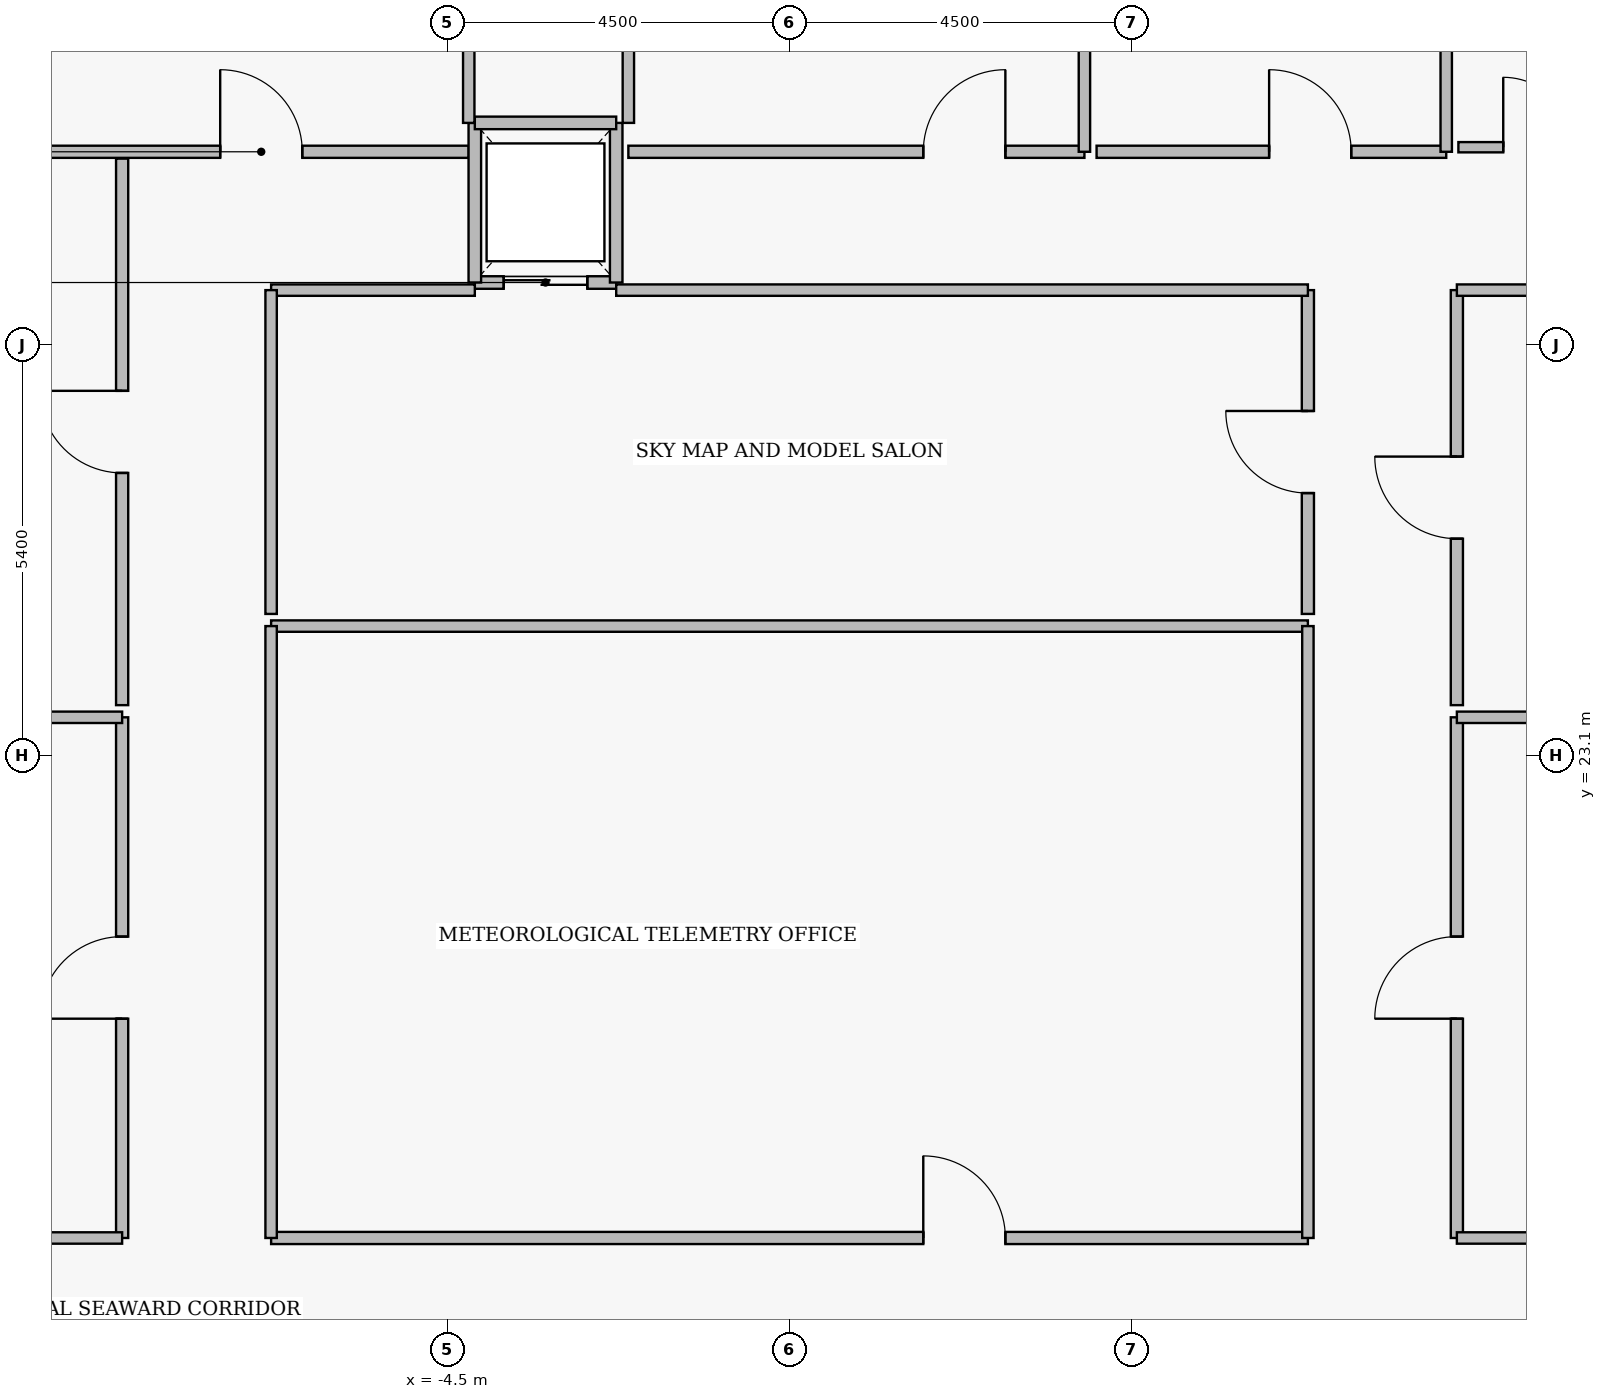
"""IFC4 building model, lengths in metres.
Left out: names, types, materials, properties, quantities, classifications, styles, units other than length and angle.
Written with IfcOpenShell. Run it as: python <this file> out.ifc"""

import sys

from ifc_helpers import new_model, si_unit, direction, frame, frame_2d, origin, place, context, subcontext, project, spatial, rectangle, extrude, element, fill, save


model = new_model("IFC4")
c1 = context("Model", 3, precision=1e-05, world=origin(), true_north=direction((0.0, 1.0)))
c2 = subcontext(c1, "Body", "Model", "MODEL_VIEW")
j1 = project(units=[si_unit("LENGTHUNIT", "METRE"), si_unit("PLANEANGLEUNIT", "RADIAN")], contexts=[c1])
p1 = place(None, origin())
s1 = spatial("IfcSite", under=j1, at=p1, CompositionType="ELEMENT")
p2 = place(p1, origin())
s2 = spatial("IfcBuilding", under=s1, at=p2, CompositionType="ELEMENT")
p3 = place(p2, frame((0.0, 0.0, 292.85)))
s3 = spatial("IfcBuildingStorey", under=s2, at=p3, CompositionType="ELEMENT", Elevation=292.85)
p4 = place(p3, frame((-4.14, 29.32, 0.0), z_axis=(0.0, 0.0, 1.0), x_axis=(1.0, 0.0, 0.0)))
e1 = element("IfcWall", 1, at=p4, inside=s3, PredefinedType="PARTITIONING", context=c2, shape_type="SweptSolid", body=[
    extrude(rectangle(XDim=1.86, YDim=0.165, at=frame_2d((0.93, 0.0))), origin(), (0.0, 0.0, 1.0), 4.16),
])
p5 = place(p4, frame((0.38, 0.0, 0.0)))
e2 = element("IfcOpeningElement", 2, at=p5, cuts=e1, PredefinedType="OPENING", context=c2, shape_type="SweptSolid", body=[
    extrude(rectangle(XDim=1.1, YDim=2.25, at=frame_2d((0.55, 1.125))), frame((0.0, 0.093, 0.0), z_axis=(0.0, -1.0, 0.0), x_axis=(1.0, 0.0, 0.0)), (0.0, 0.0, 1.0), 0.185),
])
p6 = place(p3, frame((-20.14, 31.04, 0.0), z_axis=(0.0, 0.0, 1.0), x_axis=(1.0, 0.0, 0.0)))
e3 = element("IfcWall", 3, at=p6, inside=s3, PredefinedType="PARTITIONING", context=c2, shape_type="SweptSolid", body=[
    extrude(rectangle(XDim=15.92, YDim=0.16, at=frame_2d((7.96, 0.0))), origin(), (0.0, 0.0, 1.0), 4.16),
])
p7 = place(p6, frame((12.65, 0.0, 0.0)))
e4 = element("IfcOpeningElement", 4, at=p7, cuts=e3, PredefinedType="OPENING", context=c2, shape_type="SweptSolid", body=[
    extrude(rectangle(XDim=1.08, YDim=2.18, at=frame_2d((0.54, 1.09))), frame((0.0, 0.09, 0.0), z_axis=(0.0, -1.0, 0.0), x_axis=(1.0, 0.0, 0.0)), (0.0, 0.0, 1.0), 0.18),
])
p8 = place(p3, frame((-2.12, 31.04, 0.0), z_axis=(0.0, 0.0, 1.0), x_axis=(1.0, 0.0, 0.0)))
e5 = element("IfcWall", 5, at=p8, inside=s3, PredefinedType="PARTITIONING", context=c2, shape_type="SweptSolid", body=[
    extrude(rectangle(XDim=6.0, YDim=0.16, at=frame_2d((3.0, 0.0))), origin(), (0.0, 0.0, 1.0), 4.16),
])
p9 = place(p8, frame((3.88, 0.0, 0.0)))
e6 = element("IfcOpeningElement", 6, at=p9, cuts=e5, PredefinedType="OPENING", context=c2, shape_type="SweptSolid", body=[
    extrude(rectangle(XDim=1.08, YDim=2.18, at=frame_2d((0.54, 1.09))), frame((0.0, 0.09, 0.0), z_axis=(0.0, -1.0, 0.0), x_axis=(1.0, 0.0, 0.0)), (0.0, 0.0, 1.0), 0.18),
])
p10 = place(p3, frame((4.04, 31.04, 0.0), z_axis=(0.0, 0.0, 1.0), x_axis=(1.0, 0.0, 0.0)))
e7 = element("IfcWall", 7, at=p10, inside=s3, PredefinedType="PARTITIONING", context=c2, shape_type="SweptSolid", body=[
    extrude(rectangle(XDim=4.6, YDim=0.16, at=frame_2d((2.3, 0.0))), origin(), (0.0, 0.0, 1.0), 4.16),
])
p11 = place(p10, frame((2.27, 0.0, 0.0)))
e8 = element("IfcOpeningElement", 8, at=p11, cuts=e7, PredefinedType="OPENING", context=c2, shape_type="SweptSolid", body=[
    extrude(rectangle(XDim=1.08, YDim=2.18, at=frame_2d((0.54, 1.09))), frame((0.0, 0.09, 0.0), z_axis=(0.0, -1.0, 0.0), x_axis=(1.0, 0.0, 0.0)), (0.0, 0.0, 1.0), 0.18),
])
p12 = place(p3, frame((-6.82, 16.75, 0.0), z_axis=(0.0, 0.0, 1.0), x_axis=(1.0, 0.0, 0.0)))
e9 = element("IfcWall", 9, at=p12, inside=s3, PredefinedType="PARTITIONING", context=c2, shape_type="SweptSolid", body=[
    extrude(rectangle(XDim=13.64, YDim=0.16, at=frame_2d((6.82, 0.0))), origin(), (0.0, 0.0, 1.0), 4.16),
])
p13 = place(p12, frame((8.58, 0.0, 0.0)))
e10 = element("IfcOpeningElement", 10, at=p13, cuts=e9, PredefinedType="OPENING", context=c2, shape_type="SweptSolid", body=[
    extrude(rectangle(XDim=1.08, YDim=2.18, at=frame_2d((0.54, 1.09))), frame((0.0, 0.09, 0.0), z_axis=(0.0, -1.0, 0.0), x_axis=(1.0, 0.0, 0.0)), (0.0, 0.0, 1.0), 0.18),
])
p14 = place(p3, frame((6.82, 24.96, 0.0), z_axis=(0.0, 0.0, 1.0), x_axis=(0.0, 1.0, 0.0)))
e11 = element("IfcWall", 11, at=p14, inside=s3, PredefinedType="PARTITIONING", context=c2, shape_type="SweptSolid", body=[
    extrude(rectangle(XDim=4.26, YDim=0.16, at=frame_2d((2.13, 0.0))), origin(), (0.0, 0.0, 1.0), 4.16),
])
p15 = place(p14, frame((1.59, 0.0, 0.0)))
e12 = element("IfcOpeningElement", 12, at=p15, cuts=e11, PredefinedType="OPENING", context=c2, shape_type="SweptSolid", body=[
    extrude(rectangle(XDim=1.08, YDim=2.18, at=frame_2d((0.54, 1.09))), frame((0.0, 0.09, 0.0), z_axis=(0.0, -1.0, 0.0), x_axis=(1.0, 0.0, 0.0)), (0.0, 0.0, 1.0), 0.18),
])
p16 = place(p3, frame((-8.78, 16.75, 0.0), z_axis=(0.0, 0.0, 1.0), x_axis=(0.0, 1.0, 0.0)))
e13 = element("IfcWall", 13, at=p16, inside=s3, PredefinedType="PARTITIONING", context=c2, shape_type="SweptSolid", body=[
    extrude(rectangle(XDim=6.85, YDim=0.16, at=frame_2d((3.425, 0.0))), origin(), (0.0, 0.0, 1.0), 4.16),
])
p17 = place(p16, frame((2.885, 0.0, 0.0)))
e14 = element("IfcOpeningElement", 14, at=p17, cuts=e13, PredefinedType="OPENING", context=c2, shape_type="SweptSolid", body=[
    extrude(rectangle(XDim=1.08, YDim=2.18, at=frame_2d((0.54, 1.09))), frame((0.0, 0.09, 0.0), z_axis=(0.0, -1.0, 0.0), x_axis=(1.0, 0.0, 0.0)), (0.0, 0.0, 1.0), 0.18),
])
p18 = place(p3, frame((-8.78, 23.76, 0.0), z_axis=(0.0, 0.0, 1.0), x_axis=(0.0, 1.0, 0.0)))
e15 = element("IfcWall", 15, at=p18, inside=s3, PredefinedType="PARTITIONING", context=c2, shape_type="SweptSolid", body=[
    extrude(rectangle(XDim=7.19, YDim=0.16, at=frame_2d((3.595, 0.0))), origin(), (0.0, 0.0, 1.0), 4.16),
])
p19 = place(p18, frame((3.055, 0.0, 0.0)))
e16 = element("IfcOpeningElement", 16, at=p19, cuts=e15, PredefinedType="OPENING", context=c2, shape_type="SweptSolid", body=[
    extrude(rectangle(XDim=1.08, YDim=2.18, at=frame_2d((0.54, 1.09))), frame((0.0, 0.09, 0.0), z_axis=(0.0, -1.0, 0.0), x_axis=(1.0, 0.0, 0.0)), (0.0, 0.0, 1.0), 0.18),
])
p20 = place(p3, frame((8.78, 16.75, 0.0), z_axis=(0.0, 0.0, 1.0), x_axis=(0.0, 1.0, 0.0)))
e17 = element("IfcWall", 17, at=p20, inside=s3, PredefinedType="PARTITIONING", context=c2, shape_type="SweptSolid", body=[
    extrude(rectangle(XDim=6.85, YDim=0.16, at=frame_2d((3.425, 0.0))), origin(), (0.0, 0.0, 1.0), 4.16),
])
p21 = place(p20, frame((2.885, 0.0, 0.0)))
e18 = element("IfcOpeningElement", 18, at=p21, cuts=e17, PredefinedType="OPENING", context=c2, shape_type="SweptSolid", body=[
    extrude(rectangle(XDim=1.08, YDim=2.18, at=frame_2d((0.54, 1.09))), frame((0.0, 0.09, 0.0), z_axis=(0.0, -1.0, 0.0), x_axis=(1.0, 0.0, 0.0)), (0.0, 0.0, 1.0), 0.18),
])
p22 = place(p3, frame((8.78, 23.76, 0.0), z_axis=(0.0, 0.0, 1.0), x_axis=(0.0, 1.0, 0.0)))
e19 = element("IfcWall", 19, at=p22, inside=s3, PredefinedType="PARTITIONING", context=c2, shape_type="SweptSolid", body=[
    extrude(rectangle(XDim=5.46, YDim=0.16, at=frame_2d((2.73, 0.0))), origin(), (0.0, 0.0, 1.0), 4.16),
])
p23 = place(p22, frame((2.19, 0.0, 0.0)))
e20 = element("IfcOpeningElement", 20, at=p23, cuts=e19, PredefinedType="OPENING", context=c2, shape_type="SweptSolid", body=[
    extrude(rectangle(XDim=1.08, YDim=2.18, at=frame_2d((0.54, 1.09))), frame((0.0, 0.09, 0.0), z_axis=(0.0, -1.0, 0.0), x_axis=(1.0, 0.0, 0.0)), (0.0, 0.0, 1.0), 0.18),
])
p24 = place(p3, frame((8.8, 31.1, 0.0), z_axis=(0.0, 0.0, 1.0), x_axis=(1.0, 0.0, 0.0)))
e21 = element("IfcWall", 21, at=p24, inside=s3, PredefinedType="PLUMBINGWALL", context=c2, shape_type="SweptSolid", body=[
    extrude(rectangle(XDim=2.1, YDim=0.135, at=frame_2d((1.05, 0.0))), origin(), (0.0, 0.0, 1.0), 4.16),
])
p25 = place(p24, frame((0.59, 0.0, 0.0)))
e22 = element("IfcOpeningElement", 22, at=p25, cuts=e21, PredefinedType="OPENING", context=c2, shape_type="SweptSolid", body=[
    extrude(rectangle(XDim=0.92, YDim=2.12, at=frame_2d((0.46, 1.06))), frame((0.0, 0.077, 0.0), z_axis=(0.0, -1.0, 0.0), x_axis=(1.0, 0.0, 0.0)), (0.0, 0.0, 1.0), 0.155),
])
p26 = place(p3, frame((-4.14, 29.32, 0.0), z_axis=(0.0, 0.0, 1.0), x_axis=(0.0, 1.0, 0.0)))
e23 = element("IfcWall", 23, at=p26, inside=s3, PredefinedType="PARTITIONING", context=c2, shape_type="SweptSolid", body=[
    extrude(rectangle(XDim=2.1, YDim=0.165, at=frame_2d((1.05, 0.0))), origin(), (0.0, 0.0, 1.0), 1.76),
])
p27 = place(p3, frame((-2.28, 29.32, 0.0), z_axis=(0.0, 0.0, 1.0), x_axis=(0.0, 1.0, 0.0)))
e24 = element("IfcWall", 24, at=p27, inside=s3, PredefinedType="PARTITIONING", context=c2, shape_type="SweptSolid", body=[
    extrude(rectangle(XDim=2.1, YDim=0.165, at=frame_2d((1.05, 0.0))), origin(), (0.0, 0.0, 1.0), 4.16),
])
p28 = place(p3, frame((-4.14, 31.42, 0.0), z_axis=(0.0, 0.0, 1.0), x_axis=(1.0, 0.0, 0.0)))
e25 = element("IfcWall", 25, at=p28, inside=s3, PredefinedType="PARTITIONING", context=c2, shape_type="SweptSolid", body=[
    extrude(rectangle(XDim=1.86, YDim=0.165, at=frame_2d((0.93, 0.0))), origin(), (0.0, 0.0, 1.0), 4.16),
])
p29 = place(p3, frame((-4.22, 31.42, 0.0), z_axis=(0.0, 0.0, 1.0), x_axis=(0.0, 1.0, 0.0)))
e26 = element("IfcWall", 26, at=p29, inside=s3, PredefinedType="PARTITIONING", context=c2, shape_type="SweptSolid", body=[
    extrude(rectangle(XDim=7.52, YDim=0.15, at=frame_2d((3.76, 0.0))), origin(), (0.0, 0.0, 1.0), 1.76),
])
p30 = place(p3, frame((-2.12, 31.42, 0.0), z_axis=(0.0, 0.0, 1.0), x_axis=(0.0, 1.0, 0.0)))
e27 = element("IfcWall", 27, at=p30, inside=s3, PredefinedType="PARTITIONING", context=c2, shape_type="SweptSolid", body=[
    extrude(rectangle(XDim=7.52, YDim=0.15, at=frame_2d((3.76, 0.0))), origin(), (0.0, 0.0, 1.0), 4.16),
])
for number, where, z_axis, x_axis in (
    (28, (3.88, 31.04, 0.0), (0.0, 0.0, 1.0), (0.0, 1.0, 0.0)),
    (29, (8.64, 31.04, 0.0), (0.0, 0.0, 1.0), (0.0, 1.0, 0.0)),
):
    element("IfcWall", number, at=place(p3, frame(where, z_axis=z_axis, x_axis=x_axis)), inside=s3, PredefinedType="PARTITIONING", context=c2, shape_type="SweptSolid", body=[
        extrude(rectangle(XDim=7.9, YDim=0.15, at=frame_2d((3.95, 0.0))), origin(), (0.0, 0.0, 1.0), 4.16),
    ])
p31 = place(p3, frame((-6.82, 24.8, 0.0), z_axis=(0.0, 0.0, 1.0), x_axis=(1.0, 0.0, 0.0)))
e30 = element("IfcWall", 30, at=p31, inside=s3, PredefinedType="PARTITIONING", context=c2, shape_type="SweptSolid", body=[
    extrude(rectangle(XDim=13.64, YDim=0.15, at=frame_2d((6.82, 0.0))), origin(), (0.0, 0.0, 1.0), 1.76),
])
for number, where, z_axis, x_axis in (
    (31, (-6.82, 16.75, 0.0), (0.0, 0.0, 1.0), (0.0, 1.0, 0.0)),
    (32, (6.82, 16.75, 0.0), (0.0, 0.0, 1.0), (0.0, 1.0, 0.0)),
):
    element("IfcWall", number, at=place(p3, frame(where, z_axis=z_axis, x_axis=x_axis)), inside=s3, PredefinedType="PARTITIONING", context=c2, shape_type="SweptSolid", body=[
        extrude(rectangle(XDim=8.05, YDim=0.15, at=frame_2d((4.025, 0.0))), origin(), (0.0, 0.0, 1.0), 4.16),
    ])
p32 = place(p3, frame((-6.82, 29.22, 0.0), z_axis=(0.0, 0.0, 1.0), x_axis=(1.0, 0.0, 0.0)))
e33 = element("IfcWall", 33, at=p32, inside=s3, PredefinedType="PARTITIONING", context=c2, shape_type="SweptSolid", body=[
    extrude(rectangle(XDim=2.68, YDim=0.15, at=frame_2d((1.34, 0.0))), origin(), (0.0, 0.0, 1.0), 4.16),
])
p33 = place(p3, frame((-2.28, 29.22, 0.0), z_axis=(0.0, 0.0, 1.0), x_axis=(1.0, 0.0, 0.0)))
e34 = element("IfcWall", 34, at=p33, inside=s3, PredefinedType="PARTITIONING", context=c2, shape_type="SweptSolid", body=[
    extrude(rectangle(XDim=9.1, YDim=0.15, at=frame_2d((4.55, 0.0))), origin(), (0.0, 0.0, 1.0), 4.16),
])
p34 = place(p3, frame((-6.82, 24.96, 0.0), z_axis=(0.0, 0.0, 1.0), x_axis=(0.0, 1.0, 0.0)))
e35 = element("IfcWall", 35, at=p34, inside=s3, PredefinedType="PARTITIONING", context=c2, shape_type="SweptSolid", body=[
    extrude(rectangle(XDim=4.26, YDim=0.15, at=frame_2d((2.13, 0.0))), origin(), (0.0, 0.0, 1.0), 4.16),
])
p35 = place(p3, frame((-18.62, 16.75, 0.0), z_axis=(0.0, 0.0, 1.0), x_axis=(1.0, 0.0, 0.0)))
e36 = element("IfcWall", 36, at=p35, inside=s3, PredefinedType="PARTITIONING", context=c2, shape_type="SweptSolid", body=[
    extrude(rectangle(XDim=9.84, YDim=0.15, at=frame_2d((4.92, 0.0))), origin(), (0.0, 0.0, 1.0), 4.16),
])
p36 = place(p3, frame((-20.412, 23.6, 0.0), z_axis=(0.0, 0.0, 1.0), x_axis=(1.0, 0.0, 0.0)))
e37 = element("IfcWall", 37, at=p36, inside=s3, PredefinedType="PARTITIONING", context=c2, shape_type="SweptSolid", body=[
    extrude(rectangle(XDim=11.632, YDim=0.15, at=frame_2d((5.816, 0.0))), origin(), (0.0, 0.0, 1.0), 4.16),
])
p37 = place(p3, frame((8.78, 16.75, 0.0), z_axis=(0.0, 0.0, 1.0), x_axis=(1.0, 0.0, 0.0)))
e38 = element("IfcWall", 38, at=p37, inside=s3, PredefinedType="PARTITIONING", context=c2, shape_type="SweptSolid", body=[
    extrude(rectangle(XDim=9.84, YDim=0.15, at=frame_2d((4.92, 0.0))), origin(), (0.0, 0.0, 1.0), 4.16),
])
p38 = place(p3, frame((8.78, 23.6, 0.0), z_axis=(0.0, 0.0, 1.0), x_axis=(1.0, 0.0, 0.0)))
e39 = element("IfcWall", 39, at=p38, inside=s3, PredefinedType="PARTITIONING", context=c2, shape_type="SweptSolid", body=[
    extrude(rectangle(XDim=11.632, YDim=0.15, at=frame_2d((5.816, 0.0))), origin(), (0.0, 0.0, 1.0), 4.16),
])
p39 = place(p3, frame((8.78, 29.22, 0.0), z_axis=(0.0, 0.0, 1.0), x_axis=(1.0, 0.0, 0.0)))
e40 = element("IfcWall", 40, at=p39, inside=s3, PredefinedType="PARTITIONING", context=c2, shape_type="SweptSolid", body=[
    extrude(rectangle(XDim=11.36, YDim=0.15, at=frame_2d((5.68, 0.0))), origin(), (0.0, 0.0, 1.0), 4.16),
])
p40 = place(p5, origin())
e41 = element("IfcDoor", 41, at=p40, inside=s3, OperationType="SLIDING_TO_LEFT", PredefinedType="DOOR", context=c2, shape_type="SweptSolid", body=[
    extrude(rectangle(XDim=1.1, YDim=2.25, at=frame_2d((0.55, 1.125))), frame((0.0, 0.025, 0.0), z_axis=(0.0, -1.0, 0.0), x_axis=(1.0, 0.0, 0.0)), (0.0, 0.0, 1.0), 0.05),
])
fill(e2, e41)
p41 = place(p7, origin())
e42 = element("IfcDoor", 42, at=p41, inside=s3, OperationType="SINGLE_SWING_LEFT", PredefinedType="DOOR", context=c2, shape_type="SweptSolid", body=[
    extrude(rectangle(XDim=1.08, YDim=2.18, at=frame_2d((0.54, 1.09))), frame((0.0, 0.025, 0.0), z_axis=(0.0, -1.0, 0.0), x_axis=(1.0, 0.0, 0.0)), (0.0, 0.0, 1.0), 0.05),
])
fill(e4, e42)
p42 = place(p9, origin())
e43 = element("IfcDoor", 43, at=p42, inside=s3, OperationType="SINGLE_SWING_RIGHT", PredefinedType="DOOR", context=c2, shape_type="SweptSolid", body=[
    extrude(rectangle(XDim=1.08, YDim=2.18, at=frame_2d((0.54, 1.09))), frame((0.0, 0.025, 0.0), z_axis=(0.0, -1.0, 0.0), x_axis=(1.0, 0.0, 0.0)), (0.0, 0.0, 1.0), 0.05),
])
fill(e6, e43)
p43 = place(p11, origin())
e44 = element("IfcDoor", 44, at=p43, inside=s3, OperationType="SINGLE_SWING_LEFT", PredefinedType="DOOR", context=c2, shape_type="SweptSolid", body=[
    extrude(rectangle(XDim=1.08, YDim=2.18, at=frame_2d((0.54, 1.09))), frame((0.0, 0.025, 0.0), z_axis=(0.0, -1.0, 0.0), x_axis=(1.0, 0.0, 0.0)), (0.0, 0.0, 1.0), 0.05),
])
fill(e8, e44)
p44 = place(p13, origin())
e45 = element("IfcDoor", 45, at=p44, inside=s3, OperationType="SINGLE_SWING_LEFT", PredefinedType="DOOR", context=c2, shape_type="SweptSolid", body=[
    extrude(rectangle(XDim=1.08, YDim=2.18, at=frame_2d((0.54, 1.09))), frame((0.0, 0.025, 0.0), z_axis=(0.0, -1.0, 0.0), x_axis=(1.0, 0.0, 0.0)), (0.0, 0.0, 1.0), 0.05),
])
fill(e10, e45)
p45 = place(p15, origin())
e46 = element("IfcDoor", 46, at=p45, inside=s3, OperationType="SINGLE_SWING_RIGHT", PredefinedType="DOOR", context=c2, shape_type="SweptSolid", body=[
    extrude(rectangle(XDim=1.08, YDim=2.18, at=frame_2d((0.54, 1.09))), frame((0.0, 0.025, 0.0), z_axis=(0.0, -1.0, 0.0), x_axis=(1.0, 0.0, 0.0)), (0.0, 0.0, 1.0), 0.05),
])
fill(e12, e46)
p46 = place(p17, origin())
e47 = element("IfcDoor", 47, at=p46, inside=s3, OperationType="SINGLE_SWING_LEFT", PredefinedType="DOOR", context=c2, shape_type="SweptSolid", body=[
    extrude(rectangle(XDim=1.08, YDim=2.18, at=frame_2d((0.54, 1.09))), frame((0.0, 0.025, 0.0), z_axis=(0.0, -1.0, 0.0), x_axis=(1.0, 0.0, 0.0)), (0.0, 0.0, 1.0), 0.05),
])
fill(e14, e47)
p47 = place(p19, origin())
e48 = element("IfcDoor", 48, at=p47, inside=s3, OperationType="SINGLE_SWING_RIGHT", PredefinedType="DOOR", context=c2, shape_type="SweptSolid", body=[
    extrude(rectangle(XDim=1.08, YDim=2.18, at=frame_2d((0.54, 1.09))), frame((0.0, 0.025, 0.0), z_axis=(0.0, -1.0, 0.0), x_axis=(1.0, 0.0, 0.0)), (0.0, 0.0, 1.0), 0.05),
])
fill(e16, e48)
p48 = place(p21, origin())
e49 = element("IfcDoor", 49, at=p48, inside=s3, OperationType="SINGLE_SWING_LEFT", PredefinedType="DOOR", context=c2, shape_type="SweptSolid", body=[
    extrude(rectangle(XDim=1.08, YDim=2.18, at=frame_2d((0.54, 1.09))), frame((0.0, 0.025, 0.0), z_axis=(0.0, -1.0, 0.0), x_axis=(1.0, 0.0, 0.0)), (0.0, 0.0, 1.0), 0.05),
])
fill(e18, e49)
p49 = place(p23, origin())
e50 = element("IfcDoor", 50, at=p49, inside=s3, OperationType="SINGLE_SWING_RIGHT", PredefinedType="DOOR", context=c2, shape_type="SweptSolid", body=[
    extrude(rectangle(XDim=1.08, YDim=2.18, at=frame_2d((0.54, 1.09))), frame((0.0, 0.025, 0.0), z_axis=(0.0, -1.0, 0.0), x_axis=(1.0, 0.0, 0.0)), (0.0, 0.0, 1.0), 0.05),
])
fill(e20, e50)
p50 = place(p25, origin())
e51 = element("IfcDoor", 51, at=p50, inside=s3, OperationType="SINGLE_SWING_LEFT", PredefinedType="DOOR", context=c2, shape_type="SweptSolid", body=[
    extrude(rectangle(XDim=0.92, YDim=2.12, at=frame_2d((0.46, 1.06))), frame((0.0, 0.025, 0.0), z_axis=(0.0, -1.0, 0.0), x_axis=(1.0, 0.0, 0.0)), (0.0, 0.0, 1.0), 0.05),
])
fill(e22, e51)
save(model, sys.argv[1])
